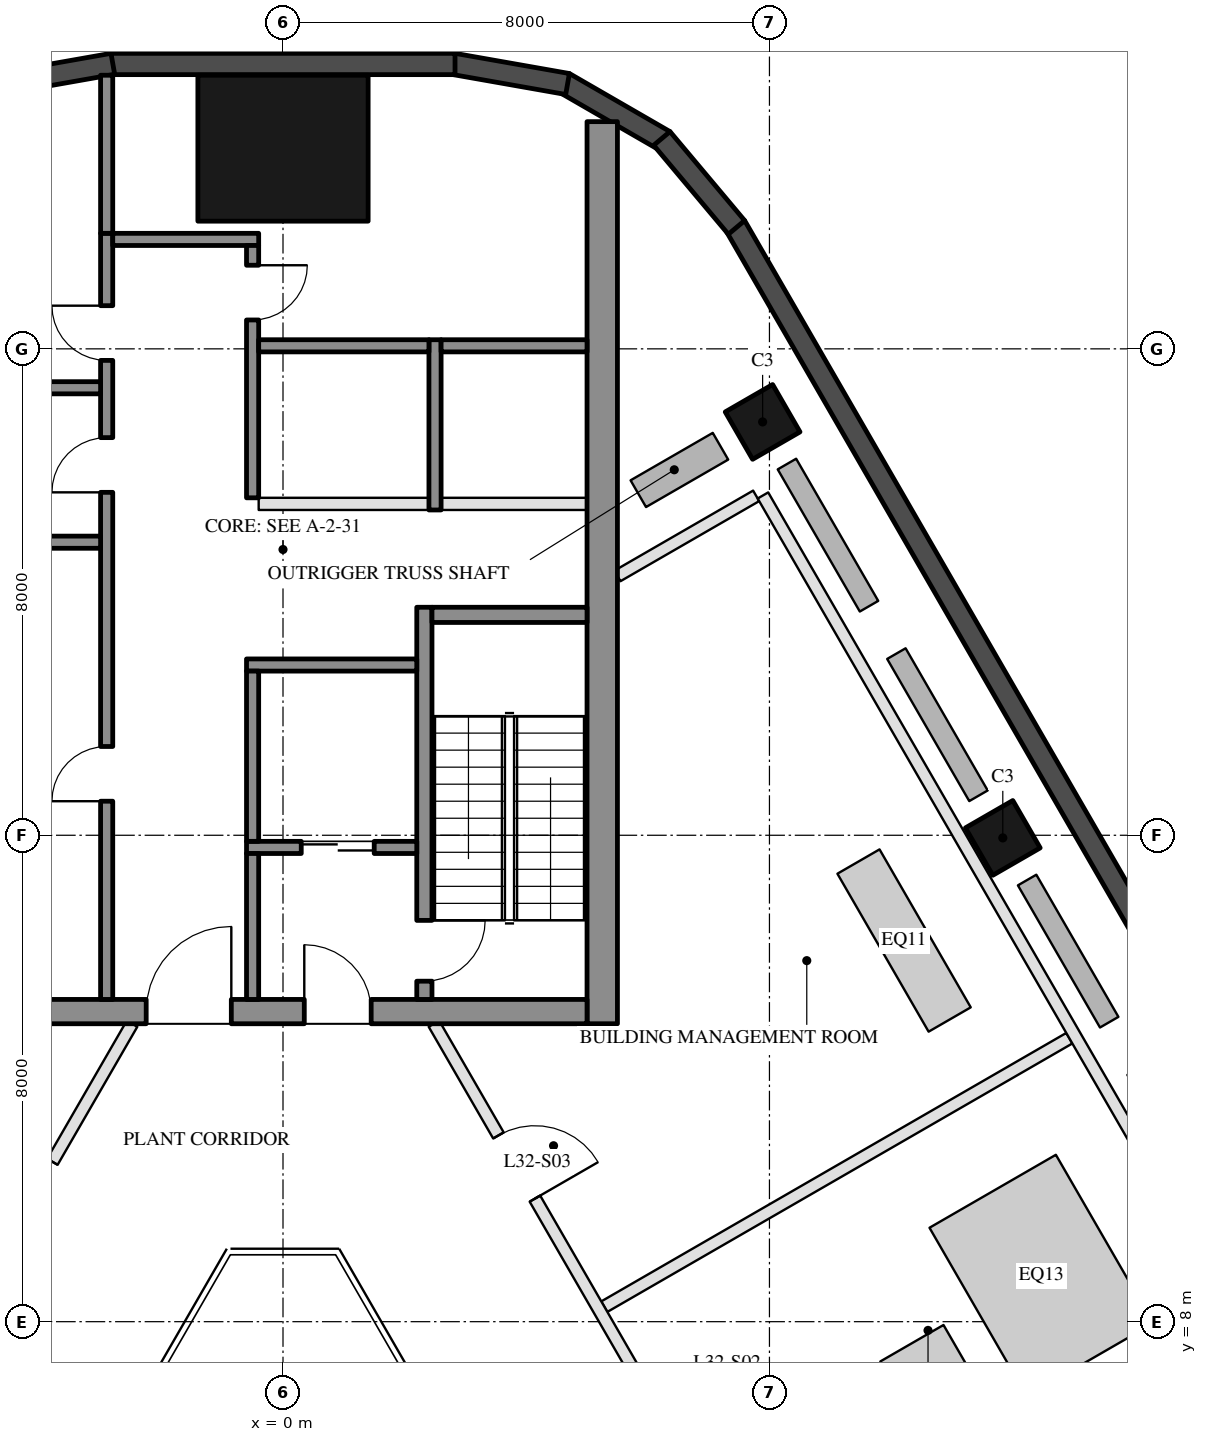
"""IFC4 building model, lengths in metres.
Left out: names, types, materials, properties, quantities, classifications, styles, units other than length and angle.
Written with IfcOpenShell. Run it as: python <this file> out.ifc"""

import sys

from ifc_helpers import new_model, si_unit, direction, frame, frame_2d, origin, origin_2d, place, context, subcontext, project, spatial, rectangle, hollow_rectangle, extrude, element, fill, save


model = new_model("IFC4")
c1 = context("Model", 3, precision=1e-05, world=origin(), true_north=direction((0.0, 1.0)))
c2 = subcontext(c1, "Body", "Model", "MODEL_VIEW")
j1 = project(units=[si_unit("LENGTHUNIT", "METRE"), si_unit("PLANEANGLEUNIT", "RADIAN")], contexts=[c1])
p1 = place(None, origin())
s1 = spatial("IfcSite", under=j1, at=p1, CompositionType="ELEMENT")
p2 = place(p1, origin())
s2 = spatial("IfcBuilding", under=s1, at=p2, CompositionType="ELEMENT")
p3 = place(p2, frame((0.0, 0.0, 137.6)))
s3 = spatial("IfcBuildingStorey", under=s2, at=p3, CompositionType="ELEMENT", Elevation=137.6)
for number, where, z_axis, x_axis in (
    (1, (11.838, 15.957, 0.0), (0.0, 0.0, 1.0), (-0.5, 0.866, 0.0)),
    (2, (7.888, 22.798, 0.0), (0.0, 0.0, 1.0), (-0.5, 0.866, 0.0)),
):
    element("IfcColumn", number, at=place(p3, frame(where, z_axis=z_axis, x_axis=x_axis)), inside=s3, PredefinedType="COLUMN", context=c2, shape_type="SweptSolid", body=[
        extrude(hollow_rectangle(XDim=0.9, YDim=0.9, WallThickness=0.04, at=origin_2d()), origin(), (0.0, 0.0, 1.0), 4.5),
    ])
p4 = place(p3, frame((0.0, 27.3, 0.0), z_axis=(0.0, 0.0, 1.0), x_axis=(1.0, 0.0, 0.0)))
e3 = element("IfcColumn", 3, at=p4, inside=s3, PredefinedType="COLUMN", context=c2, shape_type="SweptSolid", body=[
    extrude(hollow_rectangle(XDim=2.8, YDim=2.4, WallThickness=0.07, at=origin_2d()), origin(), (0.0, 0.0, 1.0), 4.5),
])
for number, where, z_axis, x_axis in (
    (4, (6.277, 27.422, 0.0), (0.0, 0.0, 1.0), (-0.866, 0.5, 0.0)),
    (5, (4.68, 28.356, 0.0), (0.0, 0.0, 1.0), (-0.985, 0.174, 0.0)),
):
    element("IfcWall", number, at=place(p3, frame(where, z_axis=z_axis, x_axis=x_axis)), inside=s3, PredefinedType="SOLIDWALL", context=c2, shape_type="SweptSolid", body=[
        extrude(rectangle(XDim=1.91, YDim=0.35, at=frame_2d((0.955, 0.0))), origin(), (0.0, 0.0, 1.0), 4.2),
    ])
p5 = place(p3, frame((2.829, 28.685, 0.0), z_axis=(0.0, 0.0, 1.0), x_axis=(-1.0, 0.0, 0.0)))
e6 = element("IfcWall", 6, at=p5, inside=s3, PredefinedType="SOLIDWALL", context=c2, shape_type="SweptSolid", body=[
    extrude(rectangle(XDim=5.658, YDim=0.35, at=frame_2d((2.829, 0.0))), origin(), (0.0, 0.0, 1.0), 4.2),
])
p6 = place(p3, frame((-2.799, 28.688, 0.0), z_axis=(0.0, 0.0, 1.0), x_axis=(-0.984798995425, -0.173697837091, 0.0)))
e7 = element("IfcWall", 7, at=p6, inside=s3, PredefinedType="SOLIDWALL", context=c2, shape_type="SweptSolid", body=[
    extrude(rectangle(XDim=1.91, YDim=0.35, at=frame_2d((0.955, 0.0))), origin(), (0.0, 0.0, 1.0), 4.2),
])
p7 = place(p3, frame((26.256, -6.567, 0.0), z_axis=(0.0, 0.0, 1.0), x_axis=(-0.499998380999, 0.866026338513, 0.0)))
e8 = element("IfcWall", 8, at=p7, inside=s3, PredefinedType="SOLIDWALL", context=c2, shape_type="SweptSolid", body=[
    extrude(rectangle(XDim=37.631, YDim=0.35, at=frame_2d((18.816, 0.0))), origin(), (0.0, 0.0, 1.0), 4.2),
])
p8 = place(p3, frame((7.458, 25.998, 0.0), z_axis=(0.0, 0.0, 1.0), x_axis=(-0.642808304945, 0.766027077259, 0.0)))
e9 = element("IfcWall", 9, at=p8, inside=s3, PredefinedType="SOLIDWALL", context=c2, shape_type="SweptSolid", body=[
    extrude(rectangle(XDim=1.91, YDim=0.35, at=frame_2d((0.955, 0.0))), origin(), (0.0, 0.0, 1.0), 4.2),
])
p9 = place(p3, frame((5.25, 12.9, 0.0), z_axis=(0.0, 0.0, 1.0), x_axis=(0.0, 1.0, 0.0)))
e10 = element("IfcWall", 10, at=p9, inside=s3, PredefinedType="SHEAR", context=c2, shape_type="SweptSolid", body=[
    extrude(rectangle(XDim=14.837, YDim=0.5, at=frame_2d((7.418, 0.0))), origin(), (0.0, 0.0, 1.0), 4.2),
])
p10 = place(p3, frame((5.0, 13.1, 0.0), z_axis=(0.0, 0.0, 1.0), x_axis=(-1.0, 0.0, 0.0)))
e11 = element("IfcWall", 11, at=p10, inside=s3, PredefinedType="SHEAR", context=c2, shape_type="SweptSolid", body=[
    extrude(rectangle(XDim=10.0, YDim=0.4, at=frame_2d((5.0, 0.0))), origin(), (0.0, 0.0, 1.0), 4.2),
])
p11 = place(p10, frame((3.55, 0.0, 0.0)))
e12 = element("IfcOpeningElement", 12, at=p11, cuts=e11, PredefinedType="OPENING", context=c2, shape_type="SweptSolid", body=[
    extrude(rectangle(XDim=1.1, YDim=2.1, at=frame_2d((0.55, 1.05))), frame((0.0, 0.21, 0.0), z_axis=(0.0, -1.0, 0.0), x_axis=(1.0, 0.0, 0.0)), (0.0, 0.0, 1.0), 0.42),
])
p12 = place(p10, frame((5.85, 0.0, 0.0)))
e13 = element("IfcOpeningElement", 13, at=p12, cuts=e11, PredefinedType="OPENING", context=c2, shape_type="SweptSolid", body=[
    extrude(rectangle(XDim=1.4, YDim=2.1, at=frame_2d((0.7, 1.05))), frame((0.0, 0.21, 0.0), z_axis=(0.0, -1.0, 0.0), x_axis=(1.0, 0.0, 0.0)), (0.0, 0.0, 1.0), 0.42),
])
p13 = place(p3, frame((2.325, 13.3, 0.0), z_axis=(0.0, 0.0, 1.0), x_axis=(0.0, 1.0, 0.0)))
e14 = element("IfcWall", 14, at=p13, inside=s3, PredefinedType="SHEAR", context=c2, shape_type="SweptSolid", body=[
    extrude(rectangle(XDim=6.45, YDim=0.25, at=frame_2d((3.225, 0.0))), origin(), (0.0, 0.0, 1.0), 4.2),
])
p14 = place(p13, frame((0.3, 0.0, 0.0)))
e15 = element("IfcOpeningElement", 15, at=p14, cuts=e14, PredefinedType="OPENING", context=c2, shape_type="SweptSolid", body=[
    extrude(rectangle(XDim=1.0, YDim=2.1, at=frame_2d((0.5, 1.05))), frame((0.0, 0.135, 0.0), z_axis=(0.0, -1.0, 0.0), x_axis=(1.0, 0.0, 0.0)), (0.0, 0.0, 1.0), 0.27),
])
p15 = place(p3, frame((5.0, 19.625, 0.0), z_axis=(0.0, 0.0, 1.0), x_axis=(-1.0, 0.0, 0.0)))
e16 = element("IfcWall", 16, at=p15, inside=s3, PredefinedType="SHEAR", context=c2, shape_type="SweptSolid", body=[
    extrude(rectangle(XDim=2.55, YDim=0.25, at=frame_2d((1.275, 0.0))), origin(), (0.0, 0.0, 1.0), 4.2),
])
p16 = place(p3, frame((2.2, 18.8, 0.0), z_axis=(0.0, 0.0, 1.0), x_axis=(-1.0, 0.0, 0.0)))
e17 = element("IfcWall", 17, at=p16, inside=s3, PredefinedType="SHEAR", context=c2, shape_type="SweptSolid", body=[
    extrude(rectangle(XDim=2.8, YDim=0.2, at=frame_2d((1.4, 0.0))), origin(), (0.0, 0.0, 1.0), 4.2),
])
p17 = place(p3, frame((2.2, 15.8, 0.0), z_axis=(0.0, 0.0, 1.0), x_axis=(-1.0, 0.0, 0.0)))
e18 = element("IfcWall", 18, at=p17, inside=s3, PredefinedType="SHEAR", context=c2, shape_type="SweptSolid", body=[
    extrude(rectangle(XDim=2.8, YDim=0.2, at=frame_2d((1.4, 0.0))), origin(), (0.0, 0.0, 1.0), 4.2),
])
p18 = place(p17, frame((0.7, 0.0, 0.0)))
e19 = element("IfcOpeningElement", 19, at=p18, cuts=e18, PredefinedType="OPENING", context=c2, shape_type="SweptSolid", body=[
    extrude(rectangle(XDim=1.2, YDim=2.1, at=frame_2d((0.6, 1.05))), frame((0.0, 0.11, 0.0), z_axis=(0.0, -1.0, 0.0), x_axis=(1.0, 0.0, 0.0)), (0.0, 0.0, 1.0), 0.22),
])
p19 = place(p3, frame((-0.5, 15.9, 0.0), z_axis=(0.0, 0.0, 1.0), x_axis=(0.0, 1.0, 0.0)))
e20 = element("IfcWall", 20, at=p19, inside=s3, PredefinedType="SHEAR", context=c2, shape_type="SweptSolid", body=[
    extrude(rectangle(XDim=2.8, YDim=0.2, at=frame_2d((1.4, 0.0))), origin(), (0.0, 0.0, 1.0), 4.2),
])
p20 = place(p3, frame((-0.5, 13.3, 0.0), z_axis=(0.0, 0.0, 1.0), x_axis=(0.0, 1.0, 0.0)))
e21 = element("IfcWall", 21, at=p20, inside=s3, PredefinedType="SHEAR", context=c2, shape_type="SweptSolid", body=[
    extrude(rectangle(XDim=2.4, YDim=0.2, at=frame_2d((1.2, 0.0))), origin(), (0.0, 0.0, 1.0), 4.2),
])
p21 = place(p3, frame((-2.9, 13.3, 0.0), z_axis=(0.0, 0.0, 1.0), x_axis=(0.0, 1.0, 0.0)))
e22 = element("IfcWall", 22, at=p21, inside=s3, PredefinedType="SHEAR", context=c2, shape_type="SweptSolid", body=[
    extrude(rectangle(XDim=12.6, YDim=0.2, at=frame_2d((6.3, 0.0))), origin(), (0.0, 0.0, 1.0), 4.2),
])
p22 = place(p21, frame((3.26, 0.0, 0.0)))
e23 = element("IfcOpeningElement", 23, at=p22, cuts=e22, PredefinedType="OPENING", context=c2, shape_type="SweptSolid", body=[
    extrude(rectangle(XDim=0.9, YDim=2.1, at=frame_2d((0.45, 1.05))), frame((0.0, 0.11, 0.0), z_axis=(0.0, -1.0, 0.0), x_axis=(1.0, 0.0, 0.0)), (0.0, 0.0, 1.0), 0.22),
])
p23 = place(p21, frame((8.34, 0.0, 0.0)))
e24 = element("IfcOpeningElement", 24, at=p23, cuts=e22, PredefinedType="OPENING", context=c2, shape_type="SweptSolid", body=[
    extrude(rectangle(XDim=0.9, YDim=2.1, at=frame_2d((0.45, 1.05))), frame((0.0, 0.11, 0.0), z_axis=(0.0, -1.0, 0.0), x_axis=(1.0, 0.0, 0.0)), (0.0, 0.0, 1.0), 0.22),
])
p24 = place(p21, frame((10.51, 0.0, 0.0)))
e25 = element("IfcOpeningElement", 25, at=p24, cuts=e22, PredefinedType="OPENING", context=c2, shape_type="SweptSolid", body=[
    extrude(rectangle(XDim=0.9, YDim=2.1, at=frame_2d((0.45, 1.05))), frame((0.0, 0.11, 0.0), z_axis=(0.0, -1.0, 0.0), x_axis=(1.0, 0.0, 0.0)), (0.0, 0.0, 1.0), 0.22),
])
p25 = place(p3, frame((-0.4, 25.8, 0.0), z_axis=(0.0, 0.0, 1.0), x_axis=(-1.0, 0.0, 0.0)))
e26 = element("IfcWall", 26, at=p25, inside=s3, PredefinedType="SHEAR", context=c2, shape_type="SweptSolid", body=[
    extrude(rectangle(XDim=2.4, YDim=0.2, at=frame_2d((1.2, 0.0))), origin(), (0.0, 0.0, 1.0), 4.2),
])
p26 = place(p3, frame((-0.5, 21.55, 0.0), z_axis=(0.0, 0.0, 1.0), x_axis=(0.0, 1.0, 0.0)))
e27 = element("IfcWall", 27, at=p26, inside=s3, PredefinedType="SHEAR", context=c2, shape_type="SweptSolid", body=[
    extrude(rectangle(XDim=4.15, YDim=0.2, at=frame_2d((2.075, 0.0))), origin(), (0.0, 0.0, 1.0), 4.2),
])
p27 = place(p26, frame((2.925, 0.0, 0.0)))
e28 = element("IfcOpeningElement", 28, at=p27, cuts=e27, PredefinedType="OPENING", context=c2, shape_type="SweptSolid", body=[
    extrude(rectangle(XDim=0.9, YDim=2.1, at=frame_2d((0.45, 1.05))), frame((0.0, 0.11, 0.0), z_axis=(0.0, -1.0, 0.0), x_axis=(1.0, 0.0, 0.0)), (0.0, 0.0, 1.0), 0.22),
])
for number, where, z_axis, x_axis in (
    (29, (-3.0, 20.82, 0.0), (0.0, 0.0, 1.0), (-1.0, 0.0, 0.0)),
    (30, (-3.0, 23.36, 0.0), (0.0, 0.0, 1.0), (-1.0, 0.0, 0.0)),
):
    element("IfcWall", number, at=place(p3, frame(where, z_axis=z_axis, x_axis=x_axis)), inside=s3, PredefinedType="SHEAR", context=c2, shape_type="SweptSolid", body=[
        extrude(rectangle(XDim=2.0, YDim=0.2, at=frame_2d((1.0, 0.0))), origin(), (0.0, 0.0, 1.0), 4.2),
    ])
p28 = place(p3, frame((-2.9, 25.9, 0.0), z_axis=(0.0, 0.0, 1.0), x_axis=(0.0, 1.0, 0.0)))
e31 = element("IfcWall", 31, at=p28, inside=s3, PredefinedType="SHEAR", context=c2, shape_type="SweptSolid", body=[
    extrude(rectangle(XDim=2.6, YDim=0.2, at=frame_2d((1.3, 0.0))), origin(), (0.0, 0.0, 1.0), 4.2),
])
p29 = place(p3, frame((2.5, 21.35, 0.0), z_axis=(0.0, 0.0, 1.0), x_axis=(0.0, 1.0, 0.0)))
e32 = element("IfcWall", 32, at=p29, inside=s3, PredefinedType="SHEAR", context=c2, shape_type="SweptSolid", body=[
    extrude(rectangle(XDim=2.8, YDim=0.2, at=frame_2d((1.4, 0.0))), origin(), (0.0, 0.0, 1.0), 4.2),
])
p30 = place(p3, frame((5.0, 24.05, 0.0), z_axis=(0.0, 0.0, 1.0), x_axis=(-1.0, 0.0, 0.0)))
e33 = element("IfcWall", 33, at=p30, inside=s3, PredefinedType="SHEAR", context=c2, shape_type="SweptSolid", body=[
    extrude(rectangle(XDim=2.4, YDim=0.2, at=frame_2d((1.2, 0.0))), origin(), (0.0, 0.0, 1.0), 4.2),
])
p31 = place(p3, frame((2.4, 24.05, 0.0), z_axis=(0.0, 0.0, 1.0), x_axis=(-1.0, 0.0, 0.0)))
e34 = element("IfcWall", 34, at=p31, inside=s3, PredefinedType="SHEAR", context=c2, shape_type="SweptSolid", body=[
    extrude(rectangle(XDim=2.8, YDim=0.2, at=frame_2d((1.4, 0.0))), origin(), (0.0, 0.0, 1.0), 4.2),
])
p32 = place(p3, frame((5.0, 21.45, 0.0), z_axis=(0.0, 0.0, 1.0), x_axis=(-1.0, 0.0, 0.0)))
e35 = element("IfcWall", 35, at=p32, inside=s3, PredefinedType="PARTITIONING", context=c2, shape_type="SweptSolid", body=[
    extrude(rectangle(XDim=2.4, YDim=0.2, at=frame_2d((1.2, 0.0))), origin(), (0.0, 0.0, 1.0), 4.2),
])
p33 = place(p3, frame((2.4, 21.45, 0.0), z_axis=(0.0, 0.0, 1.0), x_axis=(-1.0, 0.0, 0.0)))
e36 = element("IfcWall", 36, at=p33, inside=s3, PredefinedType="PARTITIONING", context=c2, shape_type="SweptSolid", body=[
    extrude(rectangle(XDim=2.8, YDim=0.2, at=frame_2d((1.4, 0.0))), origin(), (0.0, 0.0, 1.0), 4.2),
])
for number, where, z_axis, x_axis in (
    (37, (15.931, 7.466, 0.0), (0.0, 0.0, 1.0), (-0.866, -0.5, 0.0)),
    (38, (12.931, 12.662, 0.0), (0.0, 0.0, 1.0), (-0.866, -0.5, 0.0)),
):
    element("IfcWall", number, at=place(p3, frame(where, z_axis=z_axis, x_axis=x_axis)), inside=s3, PredefinedType="PARTITIONING", context=c2, shape_type="SweptSolid", body=[
        extrude(rectangle(XDim=8.83, YDim=0.2, at=frame_2d((4.415, 0.0))), origin(), (0.0, 0.0, 1.0), 4.2),
    ])
p34 = place(p3, frame((7.781, 21.582, 0.0), z_axis=(0.0, 0.0, 1.0), x_axis=(-0.865998849027, -0.500045991369, 0.0)))
e39 = element("IfcWall", 39, at=p34, inside=s3, PredefinedType="PARTITIONING", context=c2, shape_type="SweptSolid", body=[
    extrude(rectangle(XDim=2.635, YDim=0.2, at=frame_2d((1.317, 0.0))), origin(), (0.0, 0.0, 1.0), 4.2),
])
p35 = place(p3, frame((22.643, -3.959, 0.0), z_axis=(0.0, 0.0, 1.0), x_axis=(-0.499998500593, 0.866026269466, 0.0)))
e40 = element("IfcWall", 40, at=p35, inside=s3, PredefinedType="PARTITIONING", context=c2, shape_type="SweptSolid", body=[
    extrude(rectangle(XDim=29.5, YDim=0.2, at=frame_2d((14.75, 0.0))), origin(), (0.0, 0.0, 1.0), 3.41),
])
p36 = place(p3, frame((12.413, -4.3, 0.0), z_axis=(0.0, 0.0, 1.0), x_axis=(-0.50000478328, 0.866022642139, 0.0)))
e41 = element("IfcWall", 41, at=p36, inside=s3, PredefinedType="PARTITIONING", context=c2, shape_type="SweptSolid", body=[
    extrude(rectangle(XDim=19.861, YDim=0.2, at=frame_2d((9.931, 0.0))), origin(), (0.0, 0.0, 1.0), 3.41),
])
p37 = place(p36, frame((3.621, 0.0, 0.0)))
e42 = element("IfcOpeningElement", 42, at=p37, cuts=e41, PredefinedType="OPENING", context=c2, shape_type="SweptSolid", body=[
    extrude(rectangle(XDim=1.2, YDim=2.1, at=frame_2d((0.6, 1.05))), frame((0.0, 0.11, 0.0), z_axis=(0.0, -1.0, 0.0), x_axis=(1.0, 0.0, 0.0)), (0.0, 0.0, 1.0), 0.22),
])
p38 = place(p36, frame((10.831, 0.0, 0.0)))
e43 = element("IfcOpeningElement", 43, at=p38, cuts=e41, PredefinedType="OPENING", context=c2, shape_type="SweptSolid", body=[
    extrude(rectangle(XDim=1.2, YDim=2.1, at=frame_2d((0.6, 1.05))), frame((0.0, 0.11, 0.0), z_axis=(0.0, -1.0, 0.0), x_axis=(1.0, 0.0, 0.0)), (0.0, 0.0, 1.0), 0.22),
])
p39 = place(p36, frame((16.54, 0.0, 0.0)))
e44 = element("IfcOpeningElement", 44, at=p39, cuts=e41, PredefinedType="OPENING", context=c2, shape_type="SweptSolid", body=[
    extrude(rectangle(XDim=1.2, YDim=2.1, at=frame_2d((0.6, 1.05))), frame((0.0, 0.11, 0.0), z_axis=(0.0, -1.0, 0.0), x_axis=(1.0, 0.0, 0.0)), (0.0, 0.0, 1.0), 0.22),
])
p40 = place(p3, frame((-2.482, 12.9, 0.0), z_axis=(0.0, 0.0, 1.0), x_axis=(-0.50000478328, -0.866022642139, 0.0)))
e45 = element("IfcWall", 45, at=p40, inside=s3, PredefinedType="PARTITIONING", context=c2, shape_type="SweptSolid", body=[
    extrude(rectangle(XDim=19.861, YDim=0.2, at=frame_2d((9.931, 0.0))), origin(), (0.0, 0.0, 1.0), 3.41),
])
p41 = place(p40, frame((2.621, 0.0, 0.0)))
e46 = element("IfcOpeningElement", 46, at=p41, cuts=e45, PredefinedType="OPENING", context=c2, shape_type="SweptSolid", body=[
    extrude(rectangle(XDim=1.2, YDim=2.1, at=frame_2d((0.6, 1.05))), frame((0.0, 0.11, 0.0), z_axis=(0.0, -1.0, 0.0), x_axis=(1.0, 0.0, 0.0)), (0.0, 0.0, 1.0), 0.22),
])
p42 = place(p40, frame((9.331, 0.0, 0.0)))
e47 = element("IfcOpeningElement", 47, at=p42, cuts=e45, PredefinedType="OPENING", context=c2, shape_type="SweptSolid", body=[
    extrude(rectangle(XDim=1.2, YDim=2.1, at=frame_2d((0.6, 1.05))), frame((0.0, 0.11, 0.0), z_axis=(0.0, -1.0, 0.0), x_axis=(1.0, 0.0, 0.0)), (0.0, 0.0, 1.0), 0.22),
])
p43 = place(p40, frame((16.04, 0.0, 0.0)))
e48 = element("IfcOpeningElement", 48, at=p43, cuts=e45, PredefinedType="OPENING", context=c2, shape_type="SweptSolid", body=[
    extrude(rectangle(XDim=1.2, YDim=2.1, at=frame_2d((0.6, 1.05))), frame((0.0, 0.11, 0.0), z_axis=(0.0, -1.0, 0.0), x_axis=(1.0, 0.0, 0.0)), (0.0, 0.0, 1.0), 0.22),
])
p44 = place(p18, origin())
e49 = element("IfcDoor", 49, at=p44, inside=s3, OperationType="DOUBLE_DOOR_SLIDING", PredefinedType="DOOR", context=c2, shape_type="SweptSolid", body=[
    extrude(rectangle(XDim=1.2, YDim=2.1, at=frame_2d((0.6, 1.05))), frame((0.0, 0.025, 0.0), z_axis=(0.0, -1.0, 0.0), x_axis=(1.0, 0.0, 0.0)), (0.0, 0.0, 1.0), 0.05),
])
fill(e19, e49)
p45 = place(p22, origin())
e50 = element("IfcDoor", 50, at=p45, inside=s3, OperationType="SINGLE_SWING_LEFT", PredefinedType="DOOR", context=c2, shape_type="SweptSolid", body=[
    extrude(rectangle(XDim=0.9, YDim=2.1, at=frame_2d((0.45, 1.05))), frame((0.0, 0.025, 0.0), z_axis=(0.0, -1.0, 0.0), x_axis=(1.0, 0.0, 0.0)), (0.0, 0.0, 1.0), 0.05),
])
fill(e23, e50)
p46 = place(p23, origin())
e51 = element("IfcDoor", 51, at=p46, inside=s3, OperationType="SINGLE_SWING_LEFT", PredefinedType="DOOR", context=c2, shape_type="SweptSolid", body=[
    extrude(rectangle(XDim=0.9, YDim=2.1, at=frame_2d((0.45, 1.05))), frame((0.0, 0.025, 0.0), z_axis=(0.0, -1.0, 0.0), x_axis=(1.0, 0.0, 0.0)), (0.0, 0.0, 1.0), 0.05),
])
fill(e24, e51)
p47 = place(p24, origin())
e52 = element("IfcDoor", 52, at=p47, inside=s3, OperationType="SINGLE_SWING_RIGHT", PredefinedType="DOOR", context=c2, shape_type="SweptSolid", body=[
    extrude(rectangle(XDim=0.9, YDim=2.1, at=frame_2d((0.45, 1.05))), frame((0.0, 0.025, 0.0), z_axis=(0.0, -1.0, 0.0), x_axis=(1.0, 0.0, 0.0)), (0.0, 0.0, 1.0), 0.05),
])
fill(e25, e52)
p48 = place(p27, frame((0.9, 0.0, 0.0), z_axis=(0.0, 0.0, 1.0), x_axis=(-1.0, 0.0, 0.0)))
e53 = element("IfcDoor", 53, at=p48, inside=s3, OperationType="SINGLE_SWING_LEFT", PredefinedType="DOOR", context=c2, shape_type="SweptSolid", body=[
    extrude(rectangle(XDim=0.9, YDim=2.1, at=frame_2d((0.45, 1.05))), frame((0.0, 0.025, 0.0), z_axis=(0.0, -1.0, 0.0), x_axis=(1.0, 0.0, 0.0)), (0.0, 0.0, 1.0), 0.05),
])
fill(e28, e53)
p49 = place(p11, frame((1.1, 0.0, 0.0), z_axis=(0.0, 0.0, 1.0), x_axis=(-1.0, 0.0, 0.0)))
e54 = element("IfcDoor", 54, at=p49, inside=s3, OperationType="SINGLE_SWING_LEFT", PredefinedType="DOOR", context=c2, shape_type="SweptSolid", body=[
    extrude(rectangle(XDim=1.1, YDim=2.1, at=frame_2d((0.55, 1.05))), frame((0.0, 0.025, 0.0), z_axis=(0.0, -1.0, 0.0), x_axis=(1.0, 0.0, 0.0)), (0.0, 0.0, 1.0), 0.05),
])
fill(e12, e54)
p50 = place(p12, frame((1.4, 0.0, 0.0), z_axis=(0.0, 0.0, 1.0), x_axis=(-1.0, 0.0, 0.0)))
e55 = element("IfcDoor", 55, at=p50, inside=s3, OperationType="DOUBLE_DOOR_SINGLE_SWING", PredefinedType="DOOR", context=c2, shape_type="SweptSolid", body=[
    extrude(rectangle(XDim=1.4, YDim=2.1, at=frame_2d((0.7, 1.05))), frame((0.0, 0.025, 0.0), z_axis=(0.0, -1.0, 0.0), x_axis=(1.0, 0.0, 0.0)), (0.0, 0.0, 1.0), 0.05),
])
fill(e13, e55)
p51 = place(p14, frame((1.0, 0.0, 0.0), z_axis=(0.0, 0.0, 1.0), x_axis=(-1.0, 0.0, 0.0)))
e56 = element("IfcDoor", 56, at=p51, inside=s3, OperationType="SINGLE_SWING_LEFT", PredefinedType="DOOR", context=c2, shape_type="SweptSolid", body=[
    extrude(rectangle(XDim=1.0, YDim=2.1, at=frame_2d((0.5, 1.05))), frame((0.0, 0.025, 0.0), z_axis=(0.0, -1.0, 0.0), x_axis=(1.0, 0.0, 0.0)), (0.0, 0.0, 1.0), 0.05),
])
fill(e15, e56)
p52 = place(p39, frame((1.2, 0.0, 0.0), z_axis=(0.0, 0.0, 1.0), x_axis=(-1.0, 0.0, 0.0)))
e57 = element("IfcDoor", 57, at=p52, inside=s3, OperationType="SINGLE_SWING_RIGHT", PredefinedType="DOOR", context=c2, shape_type="SweptSolid", body=[
    extrude(rectangle(XDim=1.2, YDim=2.1, at=frame_2d((0.6, 1.05))), frame((0.0, 0.025, 0.0), z_axis=(0.0, -1.0, 0.0), x_axis=(1.0, 0.0, 0.0)), (0.0, 0.0, 1.0), 0.05),
])
fill(e44, e57)
p53 = place(p41, frame((1.2, 0.0, 0.0), z_axis=(0.0, 0.0, 1.0), x_axis=(-1.0, 0.0, 0.0)))
e58 = element("IfcDoor", 58, at=p53, inside=s3, OperationType="SINGLE_SWING_LEFT", PredefinedType="DOOR", context=c2, shape_type="SweptSolid", body=[
    extrude(rectangle(XDim=1.2, YDim=2.1, at=frame_2d((0.6, 1.05))), frame((0.0, 0.025, 0.0), z_axis=(0.0, -1.0, 0.0), x_axis=(1.0, 0.0, 0.0)), (0.0, 0.0, 1.0), 0.05),
])
fill(e46, e58)
save(model, sys.argv[1])
